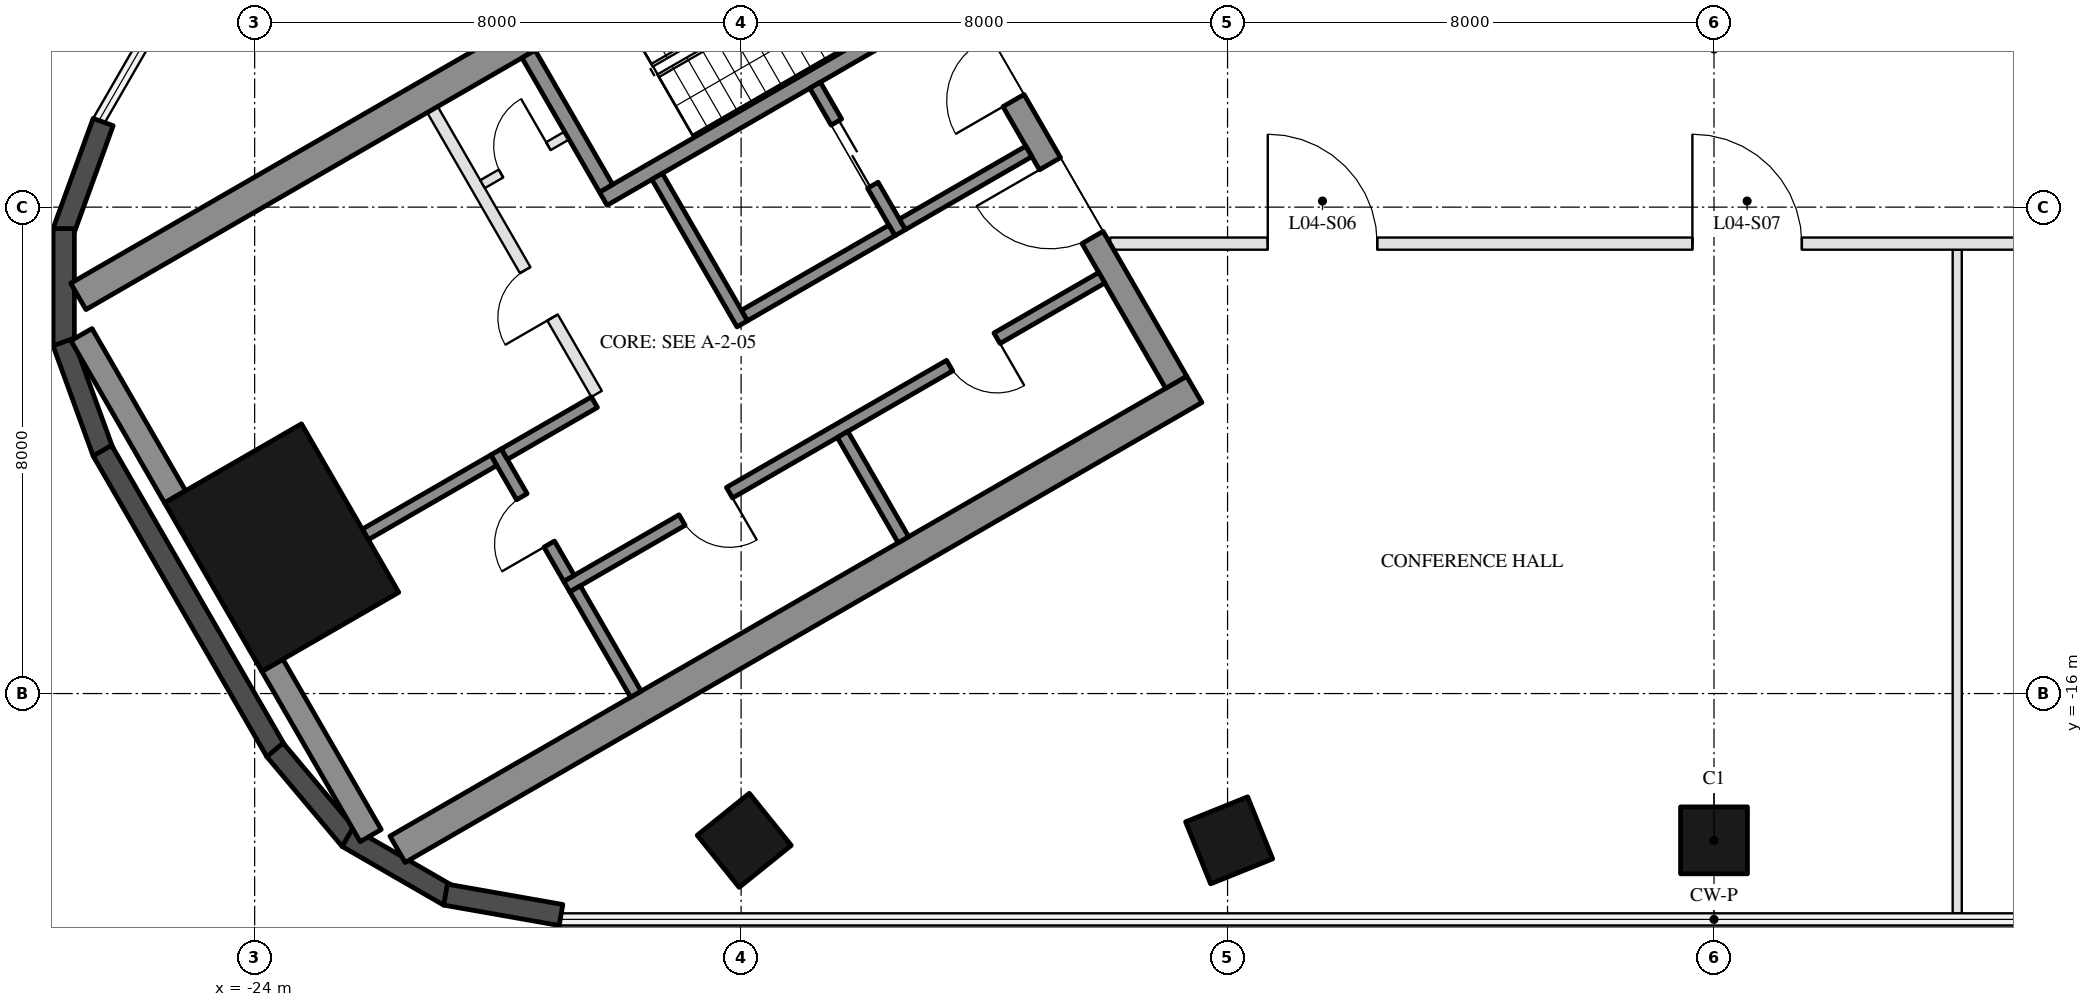
"""IFC4 building model, lengths in metres.
Left out: names, types, materials, properties, quantities, classifications, styles, units other than length and angle.
Written with IfcOpenShell. Run it as: python <this file> out.ifc"""

import sys

from ifc_helpers import new_model, si_unit, direction, frame, frame_2d, origin, origin_2d, place, context, subcontext, project, spatial, rectangle, hollow_rectangle, extrude, boolean, halfspace, element, fill, save


model = new_model("IFC4")
c1 = context("Model", 3, precision=1e-05, world=origin(), true_north=direction((0.0, 1.0)))
c2 = subcontext(c1, "Body", "Model", "MODEL_VIEW")
j1 = project(units=[si_unit("LENGTHUNIT", "METRE"), si_unit("PLANEANGLEUNIT", "RADIAN")], contexts=[c1])
p1 = place(None, origin())
s1 = spatial("IfcSite", under=j1, at=p1, CompositionType="ELEMENT")
p2 = place(p1, origin())
s2 = spatial("IfcBuilding", under=s1, at=p2, CompositionType="ELEMENT")
p3 = place(p2, frame((0.0, 0.0, 28.5)))
s3 = spatial("IfcBuildingStorey", under=s2, at=p3, CompositionType="ELEMENT", Elevation=28.5)
p4 = place(p3, frame((-15.948, -18.414, 0.0), z_axis=(0.024720370768, 0.030683618102, 0.999223407877), x_axis=(-0.99969438665, 0.000567544207, 0.024714594742)))
e1 = element("IfcColumn", 1, at=p4, inside=s3, PredefinedType="COLUMN", context=c2, shape_type="SweptSolid", body=[
    boolean("DIFFERENCE", boolean("DIFFERENCE", extrude(hollow_rectangle(XDim=1.1, YDim=1.1, WallThickness=0.05, at=origin_2d()), origin(), (0.0, 0.0, 1.0), 4.503), halfspace(frame((0.0, 0.0, 0.013), z_axis=(0.0, 0.0, 1.0), x_axis=(1.0, 0.0, 0.0)), True)), halfspace(frame((0.0, 0.0, 4.491), z_axis=(0.0, 0.0, 1.0), x_axis=(1.0, 0.0, 0.0)), False)),
])
p5 = place(p3, frame((-7.974, -18.414, 0.0), z_axis=(0.012363018834, 0.030690652017, 0.999452469927), x_axis=(-0.999923507967, 1.3568651e-05, 0.012368428817)))
e2 = element("IfcColumn", 2, at=p5, inside=s3, PredefinedType="COLUMN", context=c2, shape_type="SweptSolid", body=[
    boolean("DIFFERENCE", boolean("DIFFERENCE", extrude(hollow_rectangle(XDim=1.1, YDim=1.1, WallThickness=0.05, at=origin_2d()), origin(), (0.0, 0.0, 1.0), 4.502), halfspace(frame((0.0, 0.0, 0.011), z_axis=(0.0, 0.0, 1.0), x_axis=(1.0, 0.0, 0.0)), True)), halfspace(frame((0.0, 0.0, 4.492), z_axis=(0.0, 0.0, 1.0), x_axis=(1.0, 0.0, 0.0)), False)),
])
p6 = place(p3, frame((0.0, -18.414, 0.0), z_axis=(0.0, 0.030692997731, 0.999528858958), x_axis=(-1.0, 0.0, 0.0)))
e3 = element("IfcColumn", 3, at=p6, inside=s3, PredefinedType="COLUMN", context=c2, shape_type="SweptSolid", body=[
    boolean("DIFFERENCE", boolean("DIFFERENCE", extrude(hollow_rectangle(XDim=1.1, YDim=1.1, WallThickness=0.05, at=origin_2d()), origin(), (0.0, 0.0, 1.0), 4.502), halfspace(frame((0.0, 0.0, 0.01), z_axis=(0.0, 0.0, 1.0), x_axis=(1.0, 0.0, 0.0)), True)), halfspace(frame((0.0, 0.0, 4.492), z_axis=(0.0, 0.0, 1.0), x_axis=(1.0, 0.0, 0.0)), False)),
])
p7 = place(p3, frame((-23.556, -13.6, 0.0), z_axis=(0.0, 0.0, 1.0), x_axis=(-0.5, 0.866025403784, 0.0)))
e4 = element("IfcColumn", 4, at=p7, inside=s3, PredefinedType="COLUMN", context=c2, shape_type="SweptSolid", body=[
    extrude(hollow_rectangle(XDim=3.2, YDim=2.6, WallThickness=0.08, at=origin_2d()), origin(), (0.0, 0.0, 1.0), 4.5),
])
for number, where, z_axis, x_axis in (
    (5, (-26.491, -6.601, 0.0), (0.0, 0.0, 1.0), (-0.342, -0.94, 0.0)),
    (6, (-27.14, -8.353, 0.0), (0.0, 0.0, 1.0), (0.0, -1.0, 0.0)),
    (7, (-27.151, -10.221, 0.0), (0.0, 0.0, 1.0), (0.342, -0.94, 0.0)),
):
    element("IfcWall", number, at=place(p3, frame(where, z_axis=z_axis, x_axis=x_axis)), inside=s3, PredefinedType="SOLIDWALL", context=c2, shape_type="SweptSolid", body=[
        extrude(rectangle(XDim=1.928, YDim=0.35, at=frame_2d((0.964, 0.0))), origin(), (0.0, 0.0, 1.0), 4.2),
    ])
p8 = place(p3, frame((-26.504, -12.005, 0.0), z_axis=(0.0, 0.0, 1.0), x_axis=(0.500014776476, -0.866016872414, 0.0)))
e8 = element("IfcWall", 8, at=p8, inside=s3, PredefinedType="SOLIDWALL", context=c2, shape_type="SweptSolid", body=[
    extrude(rectangle(XDim=5.711, YDim=0.35, at=frame_2d((2.855, 0.0))), origin(), (0.0, 0.0, 1.0), 4.2),
])
for number, where, z_axis, x_axis in (
    (9, (-23.666, -16.926, 0.0), (0.0, 0.0, 1.0), (0.643, -0.766, 0.0)),
    (10, (-22.473, -18.364, 0.0), (0.0, 0.0, 1.0), (0.866, -0.5, 0.0)),
    (11, (-20.861, -19.307, 0.0), (0.0, 0.0, 1.0), (0.985, -0.174, 0.0)),
):
    element("IfcWall", number, at=place(p3, frame(where, z_axis=z_axis, x_axis=x_axis)), inside=s3, PredefinedType="SOLIDWALL", context=c2, shape_type="SweptSolid", body=[
        extrude(rectangle(XDim=1.928, YDim=0.35, at=frame_2d((0.964, 0.0))), origin(), (0.0, 0.0, 1.0), 4.2),
    ])
for number, where, z_axis, x_axis in (
    (12, (-13.797, -1.903, 0.0), (0.0, 0.0, 1.0), (-0.866, -0.5, 0.0)),
    (13, (-8.547, -10.997, 0.0), (0.0, 0.0, 1.0), (-0.866, -0.5, 0.0)),
):
    element("IfcWall", number, at=place(p3, frame(where, z_axis=z_axis, x_axis=x_axis)), inside=s3, PredefinedType="SHEAR", context=c2, shape_type="SweptSolid", body=[
        extrude(rectangle(XDim=15.13, YDim=0.5, at=frame_2d((7.565, 0.0))), origin(), (0.0, 0.0, 1.0), 4.2),
    ])
p9 = place(p3, frame((-13.845, -2.22, 0.0), z_axis=(0.0, 0.0, 1.0), x_axis=(0.500004234368, -0.866022959057, 0.0)))
e14 = element("IfcWall", 14, at=p9, inside=s3, PredefinedType="SHEAR", context=c2, shape_type="SweptSolid", body=[
    extrude(rectangle(XDim=10.0, YDim=0.4, at=frame_2d((5.0, 0.0))), origin(), (0.0, 0.0, 1.0), 4.2),
])
p10 = place(p9, frame((3.55, 0.0, 0.0)))
e15 = element("IfcOpeningElement", 15, at=p10, cuts=e14, PredefinedType="OPENING", context=c2, shape_type="SweptSolid", body=[
    extrude(rectangle(XDim=1.1, YDim=2.1, at=frame_2d((0.55, 1.05))), frame((0.0, 0.21, 0.0), z_axis=(0.0, -1.0, 0.0), x_axis=(1.0, 0.0, 0.0)), (0.0, 0.0, 1.0), 0.42),
])
p11 = place(p9, frame((5.85, 0.0, 0.0)))
e16 = element("IfcOpeningElement", 16, at=p11, cuts=e14, PredefinedType="OPENING", context=c2, shape_type="SweptSolid", body=[
    extrude(rectangle(XDim=1.4, YDim=2.1, at=frame_2d((0.7, 1.05))), frame((0.0, 0.21, 0.0), z_axis=(0.0, -1.0, 0.0), x_axis=(1.0, 0.0, 0.0)), (0.0, 0.0, 1.0), 0.42),
])
p12 = place(p3, frame((-23.708, -15.536, 0.0), z_axis=(0.0, 0.0, 1.0), x_axis=(0.500012177251, -0.866018373131, 0.0)))
e17 = element("IfcWall", 17, at=p12, inside=s3, PredefinedType="SHEAR", context=c2, shape_type="SweptSolid", body=[
    extrude(rectangle(XDim=3.234, YDim=0.4, at=frame_2d((1.617, 0.0))), origin(), (0.0, 0.0, 1.0), 4.2),
])
p13 = place(p3, frame((-26.848, -10.097, 0.0), z_axis=(0.0, 0.0, 1.0), x_axis=(0.499932877268, -0.866064153644, 0.0)))
e18 = element("IfcWall", 18, at=p13, inside=s3, PredefinedType="SHEAR", context=c2, shape_type="SweptSolid", body=[
    extrude(rectangle(XDim=3.08, YDim=0.4, at=frame_2d((1.54, 0.0))), origin(), (0.0, 0.0, 1.0), 4.2),
])
p14 = place(p3, frame((-12.681, -4.636, 0.0), z_axis=(0.0, 0.0, 1.0), x_axis=(-0.866021702275, -0.500006411147, 0.0)))
e19 = element("IfcWall", 19, at=p14, inside=s3, PredefinedType="SHEAR", context=c2, shape_type="SweptSolid", body=[
    extrude(rectangle(XDim=6.45, YDim=0.25, at=frame_2d((3.225, 0.0))), origin(), (0.0, 0.0, 1.0), 4.2),
])
p15 = place(p14, frame((0.3, 0.0, 0.0)))
e20 = element("IfcOpeningElement", 20, at=p15, cuts=e19, PredefinedType="OPENING", context=c2, shape_type="SweptSolid", body=[
    extrude(rectangle(XDim=1.0, YDim=2.1, at=frame_2d((0.5, 1.05))), frame((0.0, 0.135, 0.0), z_axis=(0.0, -1.0, 0.0), x_axis=(1.0, 0.0, 0.0)), (0.0, 0.0, 1.0), 0.27),
])
p16 = place(p3, frame((-19.496, -5.482, 0.0), z_axis=(0.0, 0.0, 1.0), x_axis=(0.499990435942, -0.866030925526, 0.0)))
e21 = element("IfcWall", 21, at=p16, inside=s3, PredefinedType="SHEAR", context=c2, shape_type="SweptSolid", body=[
    extrude(rectangle(XDim=2.55, YDim=0.25, at=frame_2d((1.275, 0.0))), origin(), (0.0, 0.0, 1.0), 4.2),
])
p17 = place(p3, frame((-17.381, -7.495, 0.0), z_axis=(0.0, 0.0, 1.0), x_axis=(0.500011755427, -0.866018616679, 0.0)))
e22 = element("IfcWall", 22, at=p17, inside=s3, PredefinedType="SHEAR", context=c2, shape_type="SweptSolid", body=[
    extrude(rectangle(XDim=2.8, YDim=0.2, at=frame_2d((1.4, 0.0))), origin(), (0.0, 0.0, 1.0), 4.2),
])
p18 = place(p3, frame((-14.783, -5.995, 0.0), z_axis=(0.0, 0.0, 1.0), x_axis=(0.49994636267, -0.866056369097, 0.0)))
e23 = element("IfcWall", 23, at=p18, inside=s3, PredefinedType="SHEAR", context=c2, shape_type="SweptSolid", body=[
    extrude(rectangle(XDim=2.8, YDim=0.2, at=frame_2d((1.4, 0.0))), origin(), (0.0, 0.0, 1.0), 4.2),
])
p19 = place(p18, frame((0.7, 0.0, 0.0)))
e24 = element("IfcOpeningElement", 24, at=p19, cuts=e23, PredefinedType="OPENING", context=c2, shape_type="SweptSolid", body=[
    extrude(rectangle(XDim=1.2, YDim=2.1, at=frame_2d((0.6, 1.05))), frame((0.0, 0.11, 0.0), z_axis=(0.0, -1.0, 0.0), x_axis=(1.0, 0.0, 0.0)), (0.0, 0.0, 1.0), 0.22),
])
p20 = place(p3, frame((-13.52, -8.383, 0.0), z_axis=(0.0, 0.0, 1.0), x_axis=(-0.866034573852, -0.49998411664, 0.0)))
e25 = element("IfcWall", 25, at=p20, inside=s3, PredefinedType="SHEAR", context=c2, shape_type="SweptSolid", body=[
    extrude(rectangle(XDim=2.8, YDim=0.2, at=frame_2d((1.4, 0.0))), origin(), (0.0, 0.0, 1.0), 4.2),
])
p21 = place(p3, frame((-11.268, -7.083, 0.0), z_axis=(0.0, 0.0, 1.0), x_axis=(-0.866050077142, -0.499957262057, 0.0)))
e26 = element("IfcWall", 26, at=p21, inside=s3, PredefinedType="SHEAR", context=c2, shape_type="SweptSolid", body=[
    extrude(rectangle(XDim=2.4, YDim=0.2, at=frame_2d((1.2, 0.0))), origin(), (0.0, 0.0, 1.0), 4.2),
])
p22 = place(p3, frame((-10.068, -9.162, 0.0), z_axis=(0.0, 0.0, 1.0), x_axis=(-0.866032725843, -0.499987317609, 0.0)))
e27 = element("IfcWall", 27, at=p22, inside=s3, PredefinedType="SHEAR", context=c2, shape_type="SweptSolid", body=[
    extrude(rectangle(XDim=10.16, YDim=0.2, at=frame_2d((5.08, 0.0))), origin(), (0.0, 0.0, 1.0), 4.2),
])
p23 = place(p22, frame((1.99, 0.0, 0.0)))
e28 = element("IfcOpeningElement", 28, at=p23, cuts=e27, PredefinedType="OPENING", context=c2, shape_type="SweptSolid", body=[
    extrude(rectangle(XDim=0.9, YDim=2.1, at=frame_2d((0.45, 1.05))), frame((0.0, 0.11, 0.0), z_axis=(0.0, -1.0, 0.0), x_axis=(1.0, 0.0, 0.0)), (0.0, 0.0, 1.0), 0.22),
])
p24 = place(p22, frame((7.07, 0.0, 0.0)))
e29 = element("IfcOpeningElement", 29, at=p24, cuts=e27, PredefinedType="OPENING", context=c2, shape_type="SweptSolid", body=[
    extrude(rectangle(XDim=0.9, YDim=2.1, at=frame_2d((0.45, 1.05))), frame((0.0, 0.11, 0.0), z_axis=(0.0, -1.0, 0.0), x_axis=(1.0, 0.0, 0.0)), (0.0, 0.0, 1.0), 0.22),
])
p25 = place(p3, frame((-20.031, -12.026, 0.0), z_axis=(0.0, 0.0, 1.0), x_axis=(0.500033551112, -0.866006032174, 0.0)))
e30 = element("IfcWall", 30, at=p25, inside=s3, PredefinedType="SHEAR", context=c2, shape_type="SweptSolid", body=[
    extrude(rectangle(XDim=2.4, YDim=0.2, at=frame_2d((1.2, 0.0))), origin(), (0.0, 0.0, 1.0), 4.2),
])
p26 = place(p25, frame((0.85, 0.0, 0.0)))
e31 = element("IfcOpeningElement", 31, at=p26, cuts=e30, PredefinedType="OPENING", context=c2, shape_type="SweptSolid", body=[
    extrude(rectangle(XDim=0.9, YDim=2.1, at=frame_2d((0.45, 1.05))), frame((0.0, 0.11, 0.0), z_axis=(0.0, -1.0, 0.0), x_axis=(1.0, 0.0, 0.0)), (0.0, 0.0, 1.0), 0.22),
])
p27 = place(p3, frame((-18.413, -11.208, 0.0), z_axis=(0.0, 0.0, 1.0), x_axis=(-0.866038183914, -0.499977863513, 0.0)))
e32 = element("IfcWall", 32, at=p27, inside=s3, PredefinedType="SHEAR", context=c2, shape_type="SweptSolid", body=[
    extrude(rectangle(XDim=1.71, YDim=0.2, at=frame_2d((0.855, 0.0))), origin(), (0.0, 0.0, 1.0), 4.2),
])
for number, where, z_axis, x_axis in (
    (33, (-14.331, -11.738, 0.0), (0.0, 0.0, 1.0), (0.5, -0.866, 0.0)),
    (34, (-18.73, -14.278, 0.0), (0.0, 0.0, 1.0), (0.5, -0.866, 0.0)),
):
    element("IfcWall", number, at=place(p3, frame(where, z_axis=z_axis, x_axis=x_axis)), inside=s3, PredefinedType="SHEAR", context=c2, shape_type="SweptSolid", body=[
        extrude(rectangle(XDim=2.0, YDim=0.2, at=frame_2d((1.0, 0.0))), origin(), (0.0, 0.0, 1.0), 4.2),
    ])
p28 = place(p3, frame((-20.067, -12.163, 0.0), z_axis=(0.0, 0.0, 1.0), x_axis=(-0.866048967903, -0.499959183527, 0.0)))
e35 = element("IfcWall", 35, at=p28, inside=s3, PredefinedType="SHEAR", context=c2, shape_type="SweptSolid", body=[
    extrude(rectangle(XDim=2.44, YDim=0.2, at=frame_2d((1.22, 0.0))), origin(), (0.0, 0.0, 1.0), 4.2),
])
p29 = place(p3, frame((-21.076, -6.395, 0.0), z_axis=(0.0, 0.0, 1.0), x_axis=(0.50001468107, -0.866016927499, 0.0)))
e36 = element("IfcWall", 36, at=p29, inside=s3, PredefinedType="PARTITIONING", context=c2, shape_type="SweptSolid", body=[
    extrude(rectangle(XDim=5.4, YDim=0.2, at=frame_2d((2.7, 0.0))), origin(), (0.0, 0.0, 1.0), 4.2),
])
p30 = place(p29, frame((3.05, 0.0, 0.0)))
e37 = element("IfcOpeningElement", 37, at=p30, cuts=e36, PredefinedType="OPENING", context=c2, shape_type="SweptSolid", body=[
    extrude(rectangle(XDim=0.9, YDim=2.1, at=frame_2d((0.45, 1.05))), frame((0.0, 0.11, 0.0), z_axis=(0.0, -1.0, 0.0), x_axis=(1.0, 0.0, 0.0)), (0.0, 0.0, 1.0), 0.22),
])
p31 = place(p3, frame((-18.866, -6.822, 0.0), z_axis=(0.0, 0.0, 1.0), x_axis=(-0.866028054938, -0.499995408039, 0.0)))
e38 = element("IfcWall", 38, at=p31, inside=s3, PredefinedType="PARTITIONING", context=c2, shape_type="SweptSolid", body=[
    extrude(rectangle(XDim=1.6, YDim=0.15, at=frame_2d((0.8, 0.0))), origin(), (0.0, 0.0, 1.0), 4.2),
])
p32 = place(p31, frame((0.35, 0.0, 0.0)))
e39 = element("IfcOpeningElement", 39, at=p32, cuts=e38, PredefinedType="OPENING", context=c2, shape_type="SweptSolid", body=[
    extrude(rectangle(XDim=0.9, YDim=2.1, at=frame_2d((0.45, 1.05))), frame((0.0, 0.085, 0.0), z_axis=(0.0, -1.0, 0.0), x_axis=(1.0, 0.0, 0.0)), (0.0, 0.0, 1.0), 0.17),
])
p33 = place(p3, frame((4.0, -19.614, 0.0), z_axis=(0.0, 0.0, 1.0), x_axis=(0.0, 1.0, 0.0)))
e40 = element("IfcWall", 40, at=p33, inside=s3, PredefinedType="PARTITIONING", context=c2, shape_type="SweptSolid", body=[
    extrude(rectangle(XDim=10.914, YDim=0.15, at=frame_2d((5.457, 0.0))), origin(), (0.0, 0.0, 1.0), 3.41),
])
p34 = place(p3, frame((-9.93, -8.6, 0.0), z_axis=(0.0, 0.0, 1.0), x_axis=(1.0, 0.0, 0.0)))
e41 = element("IfcWall", 41, at=p34, inside=s3, PredefinedType="PARTITIONING", context=c2, shape_type="SweptSolid", body=[
    extrude(rectangle(XDim=19.861, YDim=0.2, at=frame_2d((9.93, 0.0))), origin(), (0.0, 0.0, 1.0), 3.41),
])
p35 = place(p34, frame((2.592, 0.0, 0.0)))
e42 = element("IfcOpeningElement", 42, at=p35, cuts=e41, PredefinedType="OPENING", context=c2, shape_type="SweptSolid", body=[
    extrude(rectangle(XDim=1.8, YDim=2.4, at=frame_2d((0.9, 1.2))), frame((0.0, 0.11, 0.0), z_axis=(0.0, -1.0, 0.0), x_axis=(1.0, 0.0, 0.0)), (0.0, 0.0, 1.0), 0.22),
])
p36 = place(p34, frame((9.575, 0.0, 0.0)))
e43 = element("IfcOpeningElement", 43, at=p36, cuts=e41, PredefinedType="OPENING", context=c2, shape_type="SweptSolid", body=[
    extrude(rectangle(XDim=1.8, YDim=2.4, at=frame_2d((0.9, 1.2))), frame((0.0, 0.11, 0.0), z_axis=(0.0, -1.0, 0.0), x_axis=(1.0, 0.0, 0.0)), (0.0, 0.0, 1.0), 0.22),
])
p37 = place(p34, frame((16.377, 0.0, 0.0)))
e44 = element("IfcOpeningElement", 44, at=p37, cuts=e41, PredefinedType="OPENING", context=c2, shape_type="SweptSolid", body=[
    extrude(rectangle(XDim=1.0, YDim=2.1, at=frame_2d((0.5, 1.05))), frame((0.0, 0.11, 0.0), z_axis=(0.0, -1.0, 0.0), x_axis=(1.0, 0.0, 0.0)), (0.0, 0.0, 1.0), 0.22),
])
p38 = place(p19, origin())
e45 = element("IfcDoor", 45, at=p38, inside=s3, OperationType="DOUBLE_DOOR_SLIDING", PredefinedType="DOOR", context=c2, shape_type="SweptSolid", body=[
    extrude(rectangle(XDim=1.2, YDim=2.1, at=frame_2d((0.6, 1.05))), frame((0.0, 0.025, 0.0), z_axis=(0.0, -1.0, 0.0), x_axis=(1.0, 0.0, 0.0)), (0.0, 0.0, 1.0), 0.05),
])
fill(e24, e45)
p39 = place(p32, frame((0.9, 0.0, 0.0), z_axis=(0.0, 0.0, 1.0), x_axis=(-1.0, 0.0, 0.0)))
e46 = element("IfcDoor", 46, at=p39, inside=s3, OperationType="SINGLE_SWING_RIGHT", PredefinedType="DOOR", context=c2, shape_type="SweptSolid", body=[
    extrude(rectangle(XDim=0.9, YDim=2.1, at=frame_2d((0.45, 1.05))), frame((0.0, 0.025, 0.0), z_axis=(0.0, -1.0, 0.0), x_axis=(1.0, 0.0, 0.0)), (0.0, 0.0, 1.0), 0.05),
])
fill(e39, e46)
p40 = place(p23, origin())
e47 = element("IfcDoor", 47, at=p40, inside=s3, OperationType="SINGLE_SWING_LEFT", PredefinedType="DOOR", context=c2, shape_type="SweptSolid", body=[
    extrude(rectangle(XDim=0.9, YDim=2.1, at=frame_2d((0.45, 1.05))), frame((0.0, 0.025, 0.0), z_axis=(0.0, -1.0, 0.0), x_axis=(1.0, 0.0, 0.0)), (0.0, 0.0, 1.0), 0.05),
])
fill(e28, e47)
p41 = place(p24, origin())
e48 = element("IfcDoor", 48, at=p41, inside=s3, OperationType="SINGLE_SWING_LEFT", PredefinedType="DOOR", context=c2, shape_type="SweptSolid", body=[
    extrude(rectangle(XDim=0.9, YDim=2.1, at=frame_2d((0.45, 1.05))), frame((0.0, 0.025, 0.0), z_axis=(0.0, -1.0, 0.0), x_axis=(1.0, 0.0, 0.0)), (0.0, 0.0, 1.0), 0.05),
])
fill(e29, e48)
p42 = place(p26, frame((0.9, 0.0, 0.0), z_axis=(0.0, 0.0, 1.0), x_axis=(-1.0, 0.0, 0.0)))
e49 = element("IfcDoor", 49, at=p42, inside=s3, OperationType="SINGLE_SWING_LEFT", PredefinedType="DOOR", context=c2, shape_type="SweptSolid", body=[
    extrude(rectangle(XDim=0.9, YDim=2.1, at=frame_2d((0.45, 1.05))), frame((0.0, 0.025, 0.0), z_axis=(0.0, -1.0, 0.0), x_axis=(1.0, 0.0, 0.0)), (0.0, 0.0, 1.0), 0.05),
])
fill(e31, e49)
p43 = place(p30, frame((0.9, 0.0, 0.0), z_axis=(0.0, 0.0, 1.0), x_axis=(-1.0, 0.0, 0.0)))
e50 = element("IfcDoor", 50, at=p43, inside=s3, OperationType="SINGLE_SWING_LEFT", PredefinedType="DOOR", context=c2, shape_type="SweptSolid", body=[
    extrude(rectangle(XDim=0.9, YDim=2.1, at=frame_2d((0.45, 1.05))), frame((0.0, 0.025, 0.0), z_axis=(0.0, -1.0, 0.0), x_axis=(1.0, 0.0, 0.0)), (0.0, 0.0, 1.0), 0.05),
])
fill(e37, e50)
p44 = place(p10, frame((1.1, 0.0, 0.0), z_axis=(0.0, 0.0, 1.0), x_axis=(-1.0, 0.0, 0.0)))
e51 = element("IfcDoor", 51, at=p44, inside=s3, OperationType="SINGLE_SWING_LEFT", PredefinedType="DOOR", context=c2, shape_type="SweptSolid", body=[
    extrude(rectangle(XDim=1.1, YDim=2.1, at=frame_2d((0.55, 1.05))), frame((0.0, 0.025, 0.0), z_axis=(0.0, -1.0, 0.0), x_axis=(1.0, 0.0, 0.0)), (0.0, 0.0, 1.0), 0.05),
])
fill(e15, e51)
p45 = place(p11, frame((1.4, 0.0, 0.0), z_axis=(0.0, 0.0, 1.0), x_axis=(-1.0, 0.0, 0.0)))
e52 = element("IfcDoor", 52, at=p45, inside=s3, OperationType="DOUBLE_DOOR_SINGLE_SWING", PredefinedType="DOOR", context=c2, shape_type="SweptSolid", body=[
    extrude(rectangle(XDim=1.4, YDim=2.1, at=frame_2d((0.7, 1.05))), frame((0.0, 0.025, 0.0), z_axis=(0.0, -1.0, 0.0), x_axis=(1.0, 0.0, 0.0)), (0.0, 0.0, 1.0), 0.05),
])
fill(e16, e52)
p46 = place(p35, origin())
e53 = element("IfcDoor", 53, at=p46, inside=s3, OperationType="DOUBLE_DOOR_SINGLE_SWING", PredefinedType="DOOR", context=c2, shape_type="SweptSolid", body=[
    extrude(rectangle(XDim=1.8, YDim=2.4, at=frame_2d((0.9, 1.2))), frame((0.0, 0.025, 0.0), z_axis=(0.0, -1.0, 0.0), x_axis=(1.0, 0.0, 0.0)), (0.0, 0.0, 1.0), 0.05),
])
fill(e42, e53)
p47 = place(p36, origin())
e54 = element("IfcDoor", 54, at=p47, inside=s3, OperationType="DOUBLE_DOOR_SINGLE_SWING", PredefinedType="DOOR", context=c2, shape_type="SweptSolid", body=[
    extrude(rectangle(XDim=1.8, YDim=2.4, at=frame_2d((0.9, 1.2))), frame((0.0, 0.025, 0.0), z_axis=(0.0, -1.0, 0.0), x_axis=(1.0, 0.0, 0.0)), (0.0, 0.0, 1.0), 0.05),
])
fill(e43, e54)
save(model, sys.argv[1])
